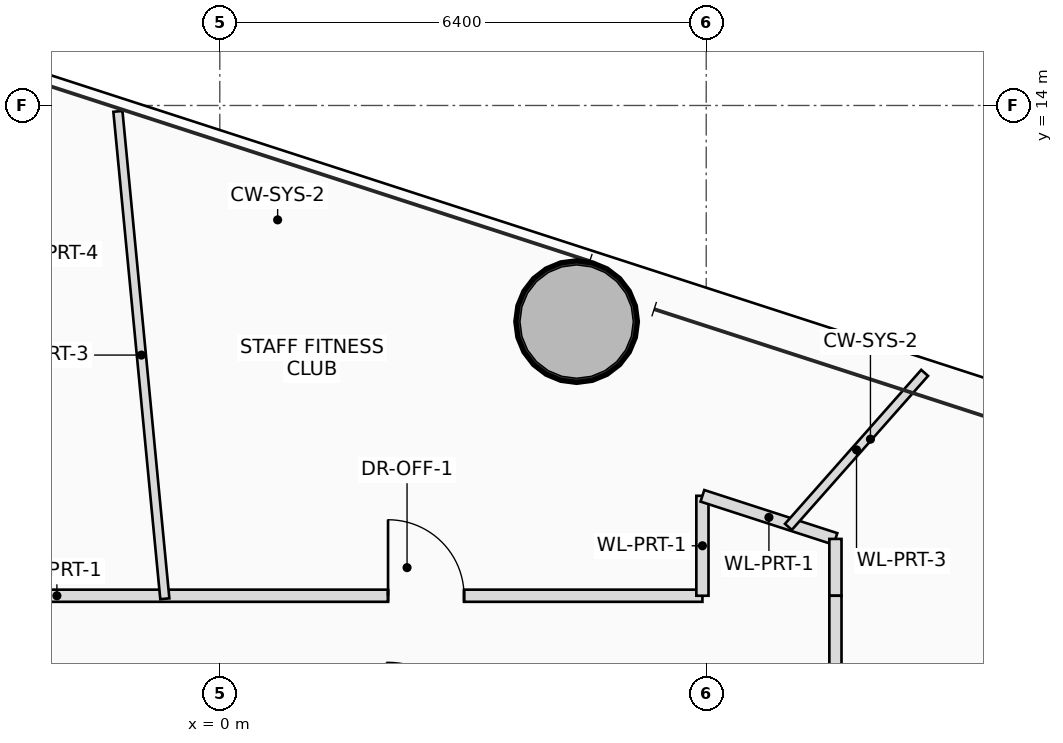
"""IFC4 building model, lengths in metres.
Left out: names, types, materials, properties, quantities, classifications, styles, units other than length and angle.
Written with IfcOpenShell. Run it as: python <this file> out.ifc"""

import sys

from ifc_helpers import new_model, si_unit, direction, frame, frame_2d, origin, origin_2d, place, context, subcontext, project, spatial, rectangle, hollow_circle, extrude, source, transform, mapped, element, fill, save


model = new_model("IFC4")
c1 = context("Model", 3, precision=1e-05, world=origin(), true_north=direction((0.0, 1.0)))
c2 = subcontext(c1, "Body", "Model", "MODEL_VIEW")
j1 = project(units=[si_unit("LENGTHUNIT", "METRE"), si_unit("PLANEANGLEUNIT", "RADIAN")], contexts=[c1])
p1 = place(None, origin())
s1 = spatial("IfcSite", under=j1, at=p1, CompositionType="ELEMENT")
p2 = place(p1, origin())
s2 = spatial("IfcBuilding", under=s1, at=p2, CompositionType="ELEMENT")
p3 = place(p2, frame((0.0, 0.0, 73.55)))
s3 = spatial("IfcBuildingStorey", under=s2, at=p3, CompositionType="ELEMENT", Elevation=73.55)
m1 = source(origin(), c2, "Body", "SweptSolid", [
    extrude(hollow_circle(Radius=0.8, WallThickness=0.055, at=origin_2d()), origin(), (0.0, 0.0, 1.0), 3.75),
])
p4 = place(p3, frame((4.695, 11.157, 0.0), z_axis=(0.0, 0.0, 1.0), x_axis=(1.0, 0.0, 0.0)))
e1 = element("IfcColumn", 1, at=p4, inside=s3, PredefinedType="COLUMN", context=c2, shape_type="MappedRepresentation", body=[
    mapped(m1, transform((0.0, 0.0, 0.0), scale=1.0)),
])
p5 = place(p3, frame((-6.35, 7.55, 0.0), z_axis=(0.0, 0.0, 1.0), x_axis=(1.0, 0.0, 0.0)))
e2 = element("IfcWall", 2, at=p5, inside=s3, PredefinedType="PARTITIONING", context=c2, shape_type="SweptSolid", body=[
    extrude(rectangle(XDim=12.7, YDim=0.16, at=frame_2d((6.35, 0.0))), origin(), (0.0, 0.0, 1.0), 2.85),
])
p6 = place(p5, frame((8.564, 0.0, 0.0)))
e3 = element("IfcOpeningElement", 3, at=p6, cuts=e2, PredefinedType="OPENING", context=c2, shape_type="SweptSolid", body=[
    extrude(rectangle(XDim=1.0, YDim=2.25, at=frame_2d((0.5, 1.125))), frame((0.0, 0.09, 0.0), z_axis=(0.0, -1.0, 0.0), x_axis=(1.0, 0.0, 0.0)), (0.0, 0.0, 1.0), 0.18),
])
p7 = place(p3, frame((6.35, 7.55, 0.0), z_axis=(0.0, 0.0, 1.0), x_axis=(0.0, 1.0, 0.0)))
e4 = element("IfcWall", 4, at=p7, inside=s3, PredefinedType="PARTITIONING", context=c2, shape_type="SweptSolid", body=[
    extrude(rectangle(XDim=1.315, YDim=0.16, at=frame_2d((0.657, 0.0))), origin(), (0.0, 0.0, 1.0), 3.05),
])
p8 = place(p3, frame((6.35, 8.865, 0.0), z_axis=(0.0, 0.0, 1.0), x_axis=(0.951291213681, -0.308293734568, 0.0)))
e5 = element("IfcWall", 5, at=p8, inside=s3, PredefinedType="PARTITIONING", context=c2, shape_type="SweptSolid", body=[
    extrude(rectangle(XDim=1.84, YDim=0.16, at=frame_2d((0.92, 0.0))), origin(), (0.0, 0.0, 1.0), 3.2),
])
p9 = place(p3, frame((8.1, 8.298, 0.0), z_axis=(0.0, 0.0, 1.0), x_axis=(0.0, -1.0, 0.0)))
e6 = element("IfcWall", 6, at=p9, inside=s3, PredefinedType="PARTITIONING", context=c2, shape_type="SweptSolid", body=[
    extrude(rectangle(XDim=0.748, YDim=0.16, at=frame_2d((0.374, 0.0))), origin(), (0.0, 0.0, 1.0), 3.545),
])
p10 = place(p3, frame((8.1, 7.55, 0.0), z_axis=(0.0, 0.0, 1.0), x_axis=(0.0, -1.0, 0.0)))
e7 = element("IfcWall", 7, at=p10, inside=s3, PredefinedType="PARTITIONING", context=c2, shape_type="SweptSolid", body=[
    extrude(rectangle(XDim=7.53, YDim=0.16, at=frame_2d((3.765, 0.0))), origin(), (0.0, 0.0, 1.0), 2.85),
])
p11 = place(p10, frame((2.156, 0.0, 0.0)))
e8 = element("IfcOpeningElement", 8, at=p11, cuts=e7, PredefinedType="OPENING", context=c2, shape_type="SweptSolid", body=[
    extrude(rectangle(XDim=1.0, YDim=2.25, at=frame_2d((0.5, 1.125))), frame((0.0, 0.09, 0.0), z_axis=(0.0, -1.0, 0.0), x_axis=(1.0, 0.0, 0.0)), (0.0, 0.0, 1.0), 0.18),
])
p12 = place(p10, frame((5.736, 0.0, 0.0)))
e9 = element("IfcOpeningElement", 9, at=p12, cuts=e7, PredefinedType="OPENING", context=c2, shape_type="SweptSolid", body=[
    extrude(rectangle(XDim=1.0, YDim=2.25, at=frame_2d((0.5, 1.125))), frame((0.0, 0.09, 0.0), z_axis=(0.0, -1.0, 0.0), x_axis=(1.0, 0.0, 0.0)), (0.0, 0.0, 1.0), 0.18),
])
p13 = place(p3, frame((-0.723, 7.51, 0.0), z_axis=(0.0, 0.0, 1.0), x_axis=(-0.095840941038, 0.995396661648, 0.0)))
e10 = element("IfcWall", 10, at=p13, inside=s3, PredefinedType="PARTITIONING", context=c2, shape_type="SweptSolid", body=[
    extrude(rectangle(XDim=6.442, YDim=0.12, at=frame_2d((3.221, 0.0))), origin(), (0.0, 0.0, 1.0), 3.01),
])
p14 = place(p3, frame((7.481, 8.456, 0.0), z_axis=(0.0, 0.0, 1.0), x_axis=(0.662647880096, 0.7489310963, 0.0)))
e11 = element("IfcWall", 11, at=p14, inside=s3, PredefinedType="PARTITIONING", context=c2, shape_type="SweptSolid", body=[
    extrude(rectangle(XDim=2.705, YDim=0.12, at=frame_2d((1.353, 0.0))), origin(), (0.0, 0.0, 1.0), 3.01),
])
p15 = place(p6, origin())
e12 = element("IfcDoor", 12, at=p15, inside=s3, OperationType="SINGLE_SWING_LEFT", PredefinedType="DOOR", context=c2, shape_type="SweptSolid", body=[
    extrude(rectangle(XDim=1.0, YDim=2.25, at=frame_2d((0.5, 1.125))), frame((0.0, 0.025, 0.0), z_axis=(0.0, -1.0, 0.0), x_axis=(1.0, 0.0, 0.0)), (0.0, 0.0, 1.0), 0.05),
])
fill(e3, e12)
save(model, sys.argv[1])
